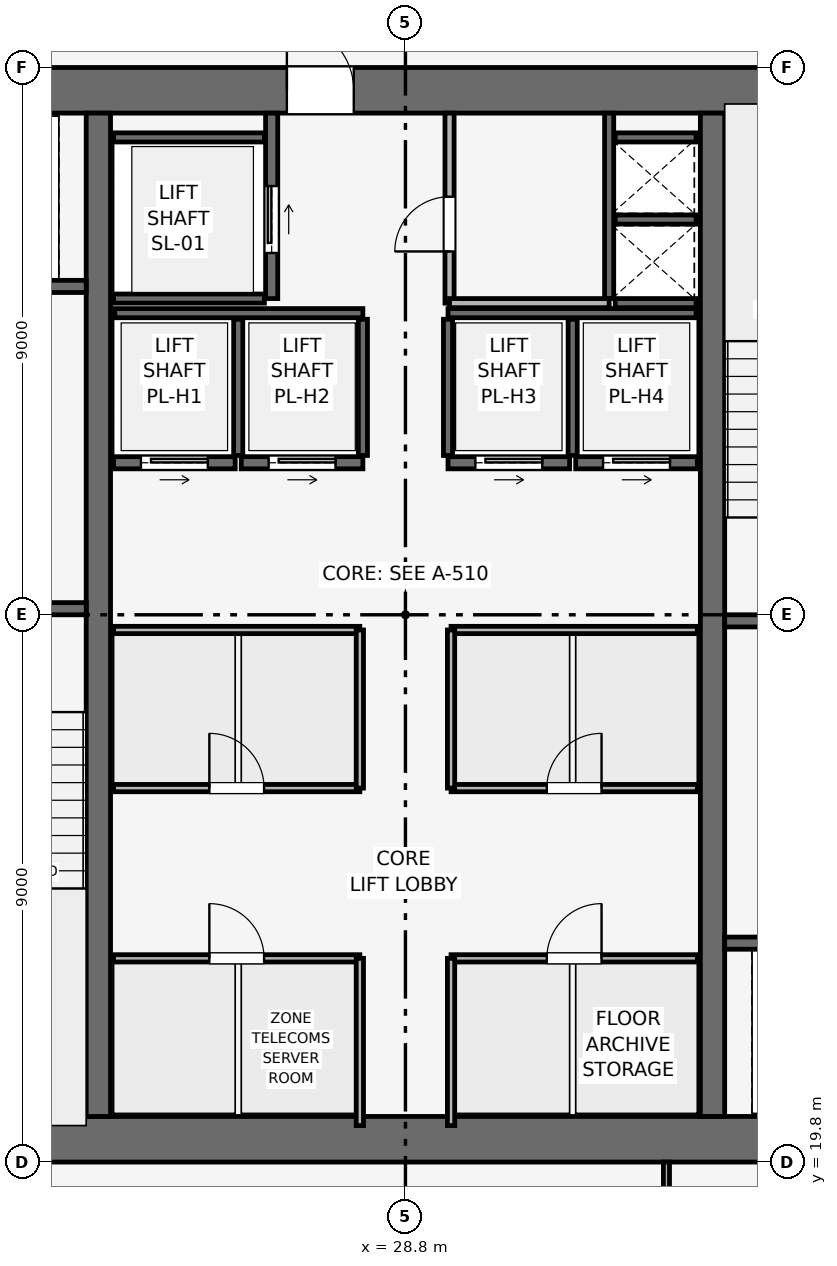
"""IFC4 building model, lengths in metres.
Left out: names, types, materials, properties, quantities, classifications, styles, units other than length and angle.
Written with IfcOpenShell. Run it as: python <this file> out.ifc"""

import sys

from ifc_helpers import new_model, si_unit, direction, frame, frame_2d, origin, place, context, subcontext, project, spatial, rectangle, extrude, element, fill, save


model = new_model("IFC4")
c1 = context("Model", 3, precision=1e-05, world=origin(), true_north=direction((0.0, 1.0)))
c2 = subcontext(c1, "Body", "Model", "MODEL_VIEW")
j1 = project(units=[si_unit("LENGTHUNIT", "METRE"), si_unit("PLANEANGLEUNIT", "RADIAN")], contexts=[c1])
p1 = place(None, origin())
s1 = spatial("IfcSite", under=j1, at=p1, CompositionType="ELEMENT")
p2 = place(p1, origin())
s2 = spatial("IfcBuilding", under=s1, at=p2, CompositionType="ELEMENT")
p3 = place(p2, frame((0.0, 0.0, 250.35)))
s3 = spatial("IfcBuildingStorey", under=s2, at=p3, CompositionType="ELEMENT", Elevation=250.35)
p4 = place(p3, frame((19.8, 20.175, 0.0), z_axis=(0.0, 0.0, 1.0), x_axis=(1.0, 0.0, 0.0)))
e1 = element("IfcWall", 1, at=p4, inside=s3, PredefinedType="SHEAR", context=c2, shape_type="SweptSolid", body=[
    extrude(rectangle(XDim=18.0, YDim=0.75, at=frame_2d((9.0, 0.0))), origin(), (0.0, 0.0, 1.0), 3.75),
])
p5 = place(p3, frame((19.8, 37.425, 0.0), z_axis=(0.0, 0.0, 1.0), x_axis=(1.0, 0.0, 0.0)))
e2 = element("IfcWall", 2, at=p5, inside=s3, PredefinedType="SHEAR", context=c2, shape_type="SweptSolid", body=[
    extrude(rectangle(XDim=18.0, YDim=0.75, at=frame_2d((9.0, 0.0))), origin(), (0.0, 0.0, 1.0), 3.75),
])
p6 = place(p5, frame((7.05, 0.0, 0.0)))
e3 = element("IfcOpeningElement", 3, at=p6, cuts=e2, PredefinedType="OPENING", context=c2, shape_type="SweptSolid", body=[
    extrude(rectangle(XDim=1.1, YDim=2.15, at=frame_2d((0.55, 1.075))), frame((0.0, 0.385, 0.0), z_axis=(0.0, -1.0, 0.0), x_axis=(1.0, 0.0, 0.0)), (0.0, 0.0, 1.0), 0.77),
])
for number, where, z_axis, x_axis in (
    (4, (23.75, 20.55, 0.0), (0.0, 0.0, 1.0), (0.0, 1.0, 0.0)),
    (5, (33.85, 20.55, 0.0), (0.0, 0.0, 1.0), (0.0, 1.0, 0.0)),
):
    element("IfcWall", number, at=place(p3, frame(where, z_axis=z_axis, x_axis=x_axis)), inside=s3, PredefinedType="SHEAR", context=c2, shape_type="SweptSolid", body=[
        extrude(rectangle(XDim=16.5, YDim=0.4, at=frame_2d((8.25, 0.0))), origin(), (0.0, 0.0, 1.0), 3.75),
    ])
p7 = place(p3, frame((20.4, 28.9, 0.0), z_axis=(0.0, 0.0, 1.0), x_axis=(1.0, 0.0, 0.0)))
e6 = element("IfcWall", 6, at=p7, inside=s3, PredefinedType="SHEAR", context=c2, shape_type="SweptSolid", body=[
    extrude(rectangle(XDim=3.15, YDim=0.2, at=frame_2d((1.575, 0.0))), origin(), (0.0, 0.0, 1.0), 3.5),
])
p8 = place(p7, frame((0.8, 0.0, 0.0)))
e7 = element("IfcOpeningElement", 7, at=p8, cuts=e6, PredefinedType="OPENING", context=c2, shape_type="SweptSolid", body=[
    extrude(rectangle(XDim=1.0, YDim=2.1, at=frame_2d((0.5, 1.05))), frame((0.0, 0.11, 0.0), z_axis=(0.0, -1.0, 0.0), x_axis=(1.0, 0.0, 0.0)), (0.0, 0.0, 1.0), 0.22),
])
p9 = place(p3, frame((34.05, 28.7, 0.0), z_axis=(0.0, 0.0, 1.0), x_axis=(1.0, 0.0, 0.0)))
e8 = element("IfcWall", 8, at=p9, inside=s3, PredefinedType="SHEAR", context=c2, shape_type="SweptSolid", body=[
    extrude(rectangle(XDim=3.15, YDim=0.2, at=frame_2d((1.575, 0.0))), origin(), (0.0, 0.0, 1.0), 3.5),
])
p10 = place(p9, frame((0.8, 0.0, 0.0)))
e9 = element("IfcOpeningElement", 9, at=p10, cuts=e8, PredefinedType="OPENING", context=c2, shape_type="SweptSolid", body=[
    extrude(rectangle(XDim=1.0, YDim=2.1, at=frame_2d((0.5, 1.05))), frame((0.0, 0.11, 0.0), z_axis=(0.0, -1.0, 0.0), x_axis=(1.0, 0.0, 0.0)), (0.0, 0.0, 1.0), 0.22),
])
p11 = place(p3, frame((32.15, 34.0, 0.0), z_axis=(0.0, 0.0, 1.0), x_axis=(0.0, 1.0, 0.0)))
e10 = element("IfcWall", 10, at=p11, inside=s3, PredefinedType="SHEAR", context=c2, shape_type="SweptSolid", body=[
    extrude(rectangle(XDim=3.05, YDim=0.15, at=frame_2d((1.525, 0.0))), origin(), (0.0, 0.0, 1.0), 3.5),
])
for number, where, z_axis, x_axis in (
    (11, (32.25, 33.925, 0.0), (0.0, 0.0, 1.0), (1.0, 0.0, 0.0)),
    (12, (32.25, 35.3, 0.0), (0.0, 0.0, 1.0), (1.0, 0.0, 0.0)),
):
    element("IfcWall", number, at=place(p3, frame(where, z_axis=z_axis, x_axis=x_axis)), inside=s3, PredefinedType="SHEAR", context=c2, shape_type="SweptSolid", body=[
        extrude(rectangle(XDim=1.33, YDim=0.15, at=frame_2d((0.665, 0.0))), origin(), (0.0, 0.0, 1.0), 3.5),
    ])
p12 = place(p3, frame((20.5, 34.2, 0.0), z_axis=(0.0, 0.0, 1.0), x_axis=(1.0, 0.0, 0.0)))
e13 = element("IfcWall", 13, at=p12, inside=s3, PredefinedType="SHEAR", context=c2, shape_type="SweptSolid", body=[
    extrude(rectangle(XDim=3.05, YDim=0.2, at=frame_2d((1.525, 0.0))), origin(), (0.0, 0.0, 1.0), 3.5),
])
p13 = place(p12, frame((0.75, 0.0, 0.0)))
e14 = element("IfcOpeningElement", 14, at=p13, cuts=e13, PredefinedType="OPENING", context=c2, shape_type="SweptSolid", body=[
    extrude(rectangle(XDim=1.1, YDim=2.15, at=frame_2d((0.55, 1.075))), frame((0.0, 0.11, 0.0), z_axis=(0.0, -1.0, 0.0), x_axis=(1.0, 0.0, 0.0)), (0.0, 0.0, 1.0), 0.22),
])
p14 = place(p3, frame((34.05, 23.4, 0.0), z_axis=(0.0, 0.0, 1.0), x_axis=(1.0, 0.0, 0.0)))
e15 = element("IfcWall", 15, at=p14, inside=s3, PredefinedType="SHEAR", context=c2, shape_type="SweptSolid", body=[
    extrude(rectangle(XDim=3.05, YDim=0.2, at=frame_2d((1.525, 0.0))), origin(), (0.0, 0.0, 1.0), 3.5),
])
p15 = place(p14, frame((1.2, 0.0, 0.0)))
e16 = element("IfcOpeningElement", 16, at=p15, cuts=e15, PredefinedType="OPENING", context=c2, shape_type="SweptSolid", body=[
    extrude(rectangle(XDim=1.1, YDim=2.15, at=frame_2d((0.55, 1.075))), frame((0.0, 0.11, 0.0), z_axis=(0.0, -1.0, 0.0), x_axis=(1.0, 0.0, 0.0)), (0.0, 0.0, 1.0), 0.22),
])
p16 = place(p3, frame((26.6, 34.0, 0.0), z_axis=(0.0, 0.0, 1.0), x_axis=(0.0, 1.0, 0.0)))
e17 = element("IfcWall", 17, at=p16, inside=s3, PredefinedType="SHEAR", context=c2, shape_type="SweptSolid", body=[
    extrude(rectangle(XDim=3.05, YDim=0.2, at=frame_2d((1.525, 0.0))), origin(), (0.0, 0.0, 1.0), 3.5),
])
p17 = place(p16, frame((0.75, 0.0, 0.0)))
e18 = element("IfcOpeningElement", 18, at=p17, cuts=e17, PredefinedType="OPENING", context=c2, shape_type="SweptSolid", body=[
    extrude(rectangle(XDim=1.1, YDim=2.15, at=frame_2d((0.55, 1.075))), frame((0.0, 0.11, 0.0), z_axis=(0.0, -1.0, 0.0), x_axis=(1.0, 0.0, 0.0)), (0.0, 0.0, 1.0), 0.22),
])
for number, where, z_axis, x_axis in (
    (19, (24.0, 34.0, 0.0), (0.0, 0.0, 1.0), (1.0, 0.0, 0.0)),
    (20, (24.0, 36.65, 0.0), (0.0, 0.0, 1.0), (1.0, 0.0, 0.0)),
):
    element("IfcWall", number, at=place(p3, frame(where, z_axis=z_axis, x_axis=x_axis)), inside=s3, PredefinedType="SHEAR", context=c2, shape_type="SweptSolid", body=[
        extrude(rectangle(XDim=2.48, YDim=0.15, at=frame_2d((1.24, 0.0))), origin(), (0.0, 0.0, 1.0), 3.5),
    ])
p18 = place(p3, frame((24.0, 31.3, 0.0), z_axis=(0.0, 0.0, 1.0), x_axis=(1.0, 0.0, 0.0)))
e21 = element("IfcWall", 21, at=p18, inside=s3, PredefinedType="SHEAR", context=c2, shape_type="SweptSolid", body=[
    extrude(rectangle(XDim=2.0, YDim=0.2, at=frame_2d((1.0, 0.0))), origin(), (0.0, 0.0, 1.0), 3.5),
])
p19 = place(p18, frame((0.45, 0.0, 0.0)))
e22 = element("IfcOpeningElement", 22, at=p19, cuts=e21, PredefinedType="OPENING", context=c2, shape_type="SweptSolid", body=[
    extrude(rectangle(XDim=1.1, YDim=2.15, at=frame_2d((0.55, 1.075))), frame((0.0, 0.11, 0.0), z_axis=(0.0, -1.0, 0.0), x_axis=(1.0, 0.0, 0.0)), (0.0, 0.0, 1.0), 0.22),
])
p20 = place(p3, frame((26.1, 31.3, 0.0), z_axis=(0.0, 0.0, 1.0), x_axis=(1.0, 0.0, 0.0)))
e23 = element("IfcWall", 23, at=p20, inside=s3, PredefinedType="SHEAR", context=c2, shape_type="SweptSolid", body=[
    extrude(rectangle(XDim=2.0, YDim=0.2, at=frame_2d((1.0, 0.0))), origin(), (0.0, 0.0, 1.0), 3.5),
])
p21 = place(p20, frame((0.45, 0.0, 0.0)))
e24 = element("IfcOpeningElement", 24, at=p21, cuts=e23, PredefinedType="OPENING", context=c2, shape_type="SweptSolid", body=[
    extrude(rectangle(XDim=1.1, YDim=2.15, at=frame_2d((0.55, 1.075))), frame((0.0, 0.11, 0.0), z_axis=(0.0, -1.0, 0.0), x_axis=(1.0, 0.0, 0.0)), (0.0, 0.0, 1.0), 0.22),
])
p22 = place(p3, frame((29.5, 31.3, 0.0), z_axis=(0.0, 0.0, 1.0), x_axis=(1.0, 0.0, 0.0)))
e25 = element("IfcWall", 25, at=p22, inside=s3, PredefinedType="SHEAR", context=c2, shape_type="SweptSolid", body=[
    extrude(rectangle(XDim=2.0, YDim=0.2, at=frame_2d((1.0, 0.0))), origin(), (0.0, 0.0, 1.0), 3.5),
])
p23 = place(p22, frame((0.45, 0.0, 0.0)))
e26 = element("IfcOpeningElement", 26, at=p23, cuts=e25, PredefinedType="OPENING", context=c2, shape_type="SweptSolid", body=[
    extrude(rectangle(XDim=1.1, YDim=2.15, at=frame_2d((0.55, 1.075))), frame((0.0, 0.11, 0.0), z_axis=(0.0, -1.0, 0.0), x_axis=(1.0, 0.0, 0.0)), (0.0, 0.0, 1.0), 0.22),
])
p24 = place(p3, frame((31.6, 31.3, 0.0), z_axis=(0.0, 0.0, 1.0), x_axis=(1.0, 0.0, 0.0)))
e27 = element("IfcWall", 27, at=p24, inside=s3, PredefinedType="SHEAR", context=c2, shape_type="SweptSolid", body=[
    extrude(rectangle(XDim=2.0, YDim=0.2, at=frame_2d((1.0, 0.0))), origin(), (0.0, 0.0, 1.0), 3.5),
])
p25 = place(p24, frame((0.45, 0.0, 0.0)))
e28 = element("IfcOpeningElement", 28, at=p25, cuts=e27, PredefinedType="OPENING", context=c2, shape_type="SweptSolid", body=[
    extrude(rectangle(XDim=1.1, YDim=2.15, at=frame_2d((0.55, 1.075))), frame((0.0, 0.11, 0.0), z_axis=(0.0, -1.0, 0.0), x_axis=(1.0, 0.0, 0.0)), (0.0, 0.0, 1.0), 0.22),
])
p26 = place(p3, frame((32.25, 36.65, 0.0), z_axis=(0.0, 0.0, 1.0), x_axis=(1.0, 0.0, 0.0)))
e29 = element("IfcWall", 29, at=p26, inside=s3, PredefinedType="SHEAR", context=c2, shape_type="SweptSolid", body=[
    extrude(rectangle(XDim=1.33, YDim=0.15, at=frame_2d((0.665, 0.0))), origin(), (0.0, 0.0, 1.0), 3.5),
])
for number, where, z_axis, x_axis in (
    (30, (24.02, 33.76, 0.0), (0.0, 0.0, 1.0), (1.0, 0.0, 0.0)),
    (31, (29.5, 33.76, 0.0), (0.0, 0.0, 1.0), (1.0, 0.0, 0.0)),
):
    element("IfcWall", number, at=place(p3, frame(where, z_axis=z_axis, x_axis=x_axis)), inside=s3, PredefinedType="SHEAR", context=c2, shape_type="SweptSolid", body=[
        extrude(rectangle(XDim=4.08, YDim=0.15, at=frame_2d((2.04, 0.0))), origin(), (0.0, 0.0, 1.0), 3.5),
    ])
for number, where, z_axis, x_axis in (
    (32, (26.05, 31.42, 0.0), (0.0, 0.0, 1.0), (0.0, 1.0, 0.0)),
    (33, (28.1, 31.42, 0.0), (0.0, 0.0, 1.0), (0.0, 1.0, 0.0)),
    (34, (29.5, 31.42, 0.0), (0.0, 0.0, 1.0), (0.0, 1.0, 0.0)),
    (35, (31.55, 31.42, 0.0), (0.0, 0.0, 1.0), (0.0, 1.0, 0.0)),
):
    element("IfcWall", number, at=place(p3, frame(where, z_axis=z_axis, x_axis=x_axis)), inside=s3, PredefinedType="SHEAR", context=c2, shape_type="SweptSolid", body=[
        extrude(rectangle(XDim=2.24, YDim=0.15, at=frame_2d((1.12, 0.0))), origin(), (0.0, 0.0, 1.0), 3.5),
    ])
p27 = place(p3, frame((29.525, 33.925, 0.0), z_axis=(0.0, 0.0, 1.0), x_axis=(0.0, 1.0, 0.0)))
e36 = element("IfcWall", 36, at=p27, inside=s3, PredefinedType="PARTITIONING", context=c2, shape_type="SweptSolid", body=[
    extrude(rectangle(XDim=3.125, YDim=0.15, at=frame_2d((1.562, 0.0))), origin(), (0.0, 0.0, 1.0), 3.5),
])
p28 = place(p27, frame((0.85, 0.0, 0.0)))
e37 = element("IfcOpeningElement", 37, at=p28, cuts=e36, PredefinedType="OPENING", context=c2, shape_type="SweptSolid", body=[
    extrude(rectangle(XDim=0.9, YDim=2.1, at=frame_2d((0.45, 1.05))), frame((0.0, 0.085, 0.0), z_axis=(0.0, -1.0, 0.0), x_axis=(1.0, 0.0, 0.0)), (0.0, 0.0, 1.0), 0.17),
])
p29 = place(p3, frame((29.525, 33.925, 0.0), z_axis=(0.0, 0.0, 1.0), x_axis=(1.0, 0.0, 0.0)))
e38 = element("IfcWall", 38, at=p29, inside=s3, PredefinedType="PARTITIONING", context=c2, shape_type="SweptSolid", body=[
    extrude(rectangle(XDim=2.625, YDim=0.15, at=frame_2d((1.312, 0.0))), origin(), (0.0, 0.0, 1.0), 3.5),
])
p30 = place(p3, frame((24.0, 23.15, 0.0), z_axis=(0.0, 0.0, 1.0), x_axis=(1.0, 0.0, 0.0)))
e39 = element("IfcWall", 39, at=p30, inside=s3, PredefinedType="PARTITIONING", context=c2, shape_type="SweptSolid", body=[
    extrude(rectangle(XDim=4.05, YDim=0.12, at=frame_2d((2.025, 0.0))), origin(), (0.0, 0.0, 1.0), 3.5),
])
p31 = place(p30, frame((1.575, 0.0, 0.0)))
e40 = element("IfcOpeningElement", 40, at=p31, cuts=e39, PredefinedType="OPENING", context=c2, shape_type="SweptSolid", body=[
    extrude(rectangle(XDim=0.9, YDim=2.1, at=frame_2d((0.45, 1.05))), frame((0.0, 0.07, 0.0), z_axis=(0.0, -1.0, 0.0), x_axis=(1.0, 0.0, 0.0)), (0.0, 0.0, 1.0), 0.14),
])
p32 = place(p3, frame((28.05, 20.4, 0.0), z_axis=(0.0, 0.0, 1.0), x_axis=(0.0, 1.0, 0.0)))
e41 = element("IfcWall", 41, at=p32, inside=s3, PredefinedType="PARTITIONING", context=c2, shape_type="SweptSolid", body=[
    extrude(rectangle(XDim=2.75, YDim=0.12, at=frame_2d((1.375, 0.0))), origin(), (0.0, 0.0, 1.0), 3.5),
])
p33 = place(p3, frame((29.55, 23.15, 0.0), z_axis=(0.0, 0.0, 1.0), x_axis=(1.0, 0.0, 0.0)))
e42 = element("IfcWall", 42, at=p33, inside=s3, PredefinedType="PARTITIONING", context=c2, shape_type="SweptSolid", body=[
    extrude(rectangle(XDim=4.05, YDim=0.12, at=frame_2d((2.025, 0.0))), origin(), (0.0, 0.0, 1.0), 3.5),
])
p34 = place(p33, frame((1.575, 0.0, 0.0)))
e43 = element("IfcOpeningElement", 43, at=p34, cuts=e42, PredefinedType="OPENING", context=c2, shape_type="SweptSolid", body=[
    extrude(rectangle(XDim=0.9, YDim=2.1, at=frame_2d((0.45, 1.05))), frame((0.0, 0.07, 0.0), z_axis=(0.0, -1.0, 0.0), x_axis=(1.0, 0.0, 0.0)), (0.0, 0.0, 1.0), 0.14),
])
p35 = place(p3, frame((29.55, 20.4, 0.0), z_axis=(0.0, 0.0, 1.0), x_axis=(0.0, 1.0, 0.0)))
e44 = element("IfcWall", 44, at=p35, inside=s3, PredefinedType="PARTITIONING", context=c2, shape_type="SweptSolid", body=[
    extrude(rectangle(XDim=2.75, YDim=0.12, at=frame_2d((1.375, 0.0))), origin(), (0.0, 0.0, 1.0), 3.5),
])
p36 = place(p3, frame((24.0, 25.95, 0.0), z_axis=(0.0, 0.0, 1.0), x_axis=(1.0, 0.0, 0.0)))
e45 = element("IfcWall", 45, at=p36, inside=s3, PredefinedType="PARTITIONING", context=c2, shape_type="SweptSolid", body=[
    extrude(rectangle(XDim=4.05, YDim=0.12, at=frame_2d((2.025, 0.0))), origin(), (0.0, 0.0, 1.0), 3.5),
])
p37 = place(p36, frame((1.575, 0.0, 0.0)))
e46 = element("IfcOpeningElement", 46, at=p37, cuts=e45, PredefinedType="OPENING", context=c2, shape_type="SweptSolid", body=[
    extrude(rectangle(XDim=0.9, YDim=2.1, at=frame_2d((0.45, 1.05))), frame((0.0, 0.07, 0.0), z_axis=(0.0, -1.0, 0.0), x_axis=(1.0, 0.0, 0.0)), (0.0, 0.0, 1.0), 0.14),
])
p38 = place(p3, frame((24.0, 28.55, 0.0), z_axis=(0.0, 0.0, 1.0), x_axis=(1.0, 0.0, 0.0)))
e47 = element("IfcWall", 47, at=p38, inside=s3, PredefinedType="PARTITIONING", context=c2, shape_type="SweptSolid", body=[
    extrude(rectangle(XDim=4.05, YDim=0.12, at=frame_2d((2.025, 0.0))), origin(), (0.0, 0.0, 1.0), 3.5),
])
p39 = place(p3, frame((28.05, 25.95, 0.0), z_axis=(0.0, 0.0, 1.0), x_axis=(0.0, 1.0, 0.0)))
e48 = element("IfcWall", 48, at=p39, inside=s3, PredefinedType="PARTITIONING", context=c2, shape_type="SweptSolid", body=[
    extrude(rectangle(XDim=2.6, YDim=0.12, at=frame_2d((1.3, 0.0))), origin(), (0.0, 0.0, 1.0), 3.5),
])
p40 = place(p3, frame((29.55, 25.95, 0.0), z_axis=(0.0, 0.0, 1.0), x_axis=(1.0, 0.0, 0.0)))
e49 = element("IfcWall", 49, at=p40, inside=s3, PredefinedType="PARTITIONING", context=c2, shape_type="SweptSolid", body=[
    extrude(rectangle(XDim=4.05, YDim=0.12, at=frame_2d((2.025, 0.0))), origin(), (0.0, 0.0, 1.0), 3.5),
])
p41 = place(p40, frame((1.575, 0.0, 0.0)))
e50 = element("IfcOpeningElement", 50, at=p41, cuts=e49, PredefinedType="OPENING", context=c2, shape_type="SweptSolid", body=[
    extrude(rectangle(XDim=0.9, YDim=2.1, at=frame_2d((0.45, 1.05))), frame((0.0, 0.07, 0.0), z_axis=(0.0, -1.0, 0.0), x_axis=(1.0, 0.0, 0.0)), (0.0, 0.0, 1.0), 0.14),
])
p42 = place(p3, frame((29.55, 28.55, 0.0), z_axis=(0.0, 0.0, 1.0), x_axis=(1.0, 0.0, 0.0)))
e51 = element("IfcWall", 51, at=p42, inside=s3, PredefinedType="PARTITIONING", context=c2, shape_type="SweptSolid", body=[
    extrude(rectangle(XDim=4.05, YDim=0.12, at=frame_2d((2.025, 0.0))), origin(), (0.0, 0.0, 1.0), 3.5),
])
p43 = place(p3, frame((29.55, 25.95, 0.0), z_axis=(0.0, 0.0, 1.0), x_axis=(0.0, 1.0, 0.0)))
e52 = element("IfcWall", 52, at=p43, inside=s3, PredefinedType="PARTITIONING", context=c2, shape_type="SweptSolid", body=[
    extrude(rectangle(XDim=2.6, YDim=0.12, at=frame_2d((1.3, 0.0))), origin(), (0.0, 0.0, 1.0), 3.5),
])
p44 = place(p3, frame((33.092, 4.03, 0.0), z_axis=(0.0, 0.0, 1.0), x_axis=(0.0, 1.0, 0.0)))
e53 = element("IfcWall", 53, at=p44, inside=s3, PredefinedType="MOVABLE", context=c2, shape_type="SweptSolid", body=[
    extrude(rectangle(XDim=15.77, YDim=0.1, at=frame_2d((7.885, 0.0))), origin(), (0.0, 0.0, 1.0), 3.085),
])
p45 = place(p44, frame((13.37, 0.0, 0.0)))
e54 = element("IfcOpeningElement", 54, at=p45, cuts=e53, PredefinedType="OPENING", context=c2, shape_type="SweptSolid", body=[
    extrude(rectangle(XDim=0.9, YDim=2.1, at=frame_2d((0.45, 1.05))), frame((0.0, 0.06, 0.0), z_axis=(0.0, -1.0, 0.0), x_axis=(1.0, 0.0, 0.0)), (0.0, 0.0, 1.0), 0.12),
])
p46 = place(p17, origin())
e55 = element("IfcDoor", 55, at=p46, inside=s3, OperationType="SLIDING_TO_RIGHT", PredefinedType="DOOR", context=c2, shape_type="SweptSolid", body=[
    extrude(rectangle(XDim=1.1, YDim=2.15, at=frame_2d((0.55, 1.075))), frame((0.0, 0.025, 0.0), z_axis=(0.0, -1.0, 0.0), x_axis=(1.0, 0.0, 0.0)), (0.0, 0.0, 1.0), 0.05),
])
fill(e18, e55)
p47 = place(p19, origin())
e56 = element("IfcDoor", 56, at=p47, inside=s3, OperationType="SLIDING_TO_RIGHT", PredefinedType="DOOR", context=c2, shape_type="SweptSolid", body=[
    extrude(rectangle(XDim=1.1, YDim=2.15, at=frame_2d((0.55, 1.075))), frame((0.0, 0.025, 0.0), z_axis=(0.0, -1.0, 0.0), x_axis=(1.0, 0.0, 0.0)), (0.0, 0.0, 1.0), 0.05),
])
fill(e22, e56)
p48 = place(p21, origin())
e57 = element("IfcDoor", 57, at=p48, inside=s3, OperationType="SLIDING_TO_RIGHT", PredefinedType="DOOR", context=c2, shape_type="SweptSolid", body=[
    extrude(rectangle(XDim=1.1, YDim=2.15, at=frame_2d((0.55, 1.075))), frame((0.0, 0.025, 0.0), z_axis=(0.0, -1.0, 0.0), x_axis=(1.0, 0.0, 0.0)), (0.0, 0.0, 1.0), 0.05),
])
fill(e24, e57)
p49 = place(p23, origin())
e58 = element("IfcDoor", 58, at=p49, inside=s3, OperationType="SLIDING_TO_RIGHT", PredefinedType="DOOR", context=c2, shape_type="SweptSolid", body=[
    extrude(rectangle(XDim=1.1, YDim=2.15, at=frame_2d((0.55, 1.075))), frame((0.0, 0.025, 0.0), z_axis=(0.0, -1.0, 0.0), x_axis=(1.0, 0.0, 0.0)), (0.0, 0.0, 1.0), 0.05),
])
fill(e26, e58)
p50 = place(p25, origin())
e59 = element("IfcDoor", 59, at=p50, inside=s3, OperationType="SLIDING_TO_RIGHT", PredefinedType="DOOR", context=c2, shape_type="SweptSolid", body=[
    extrude(rectangle(XDim=1.1, YDim=2.15, at=frame_2d((0.55, 1.075))), frame((0.0, 0.025, 0.0), z_axis=(0.0, -1.0, 0.0), x_axis=(1.0, 0.0, 0.0)), (0.0, 0.0, 1.0), 0.05),
])
fill(e28, e59)
p51 = place(p28, origin())
e60 = element("IfcDoor", 60, at=p51, inside=s3, OperationType="SINGLE_SWING_LEFT", PredefinedType="DOOR", context=c2, shape_type="SweptSolid", body=[
    extrude(rectangle(XDim=0.9, YDim=2.1, at=frame_2d((0.45, 1.05))), frame((0.0, 0.025, 0.0), z_axis=(0.0, -1.0, 0.0), x_axis=(1.0, 0.0, 0.0)), (0.0, 0.0, 1.0), 0.05),
])
fill(e37, e60)
p52 = place(p31, origin())
e61 = element("IfcDoor", 61, at=p52, inside=s3, OperationType="SINGLE_SWING_LEFT", PredefinedType="DOOR", context=c2, shape_type="SweptSolid", body=[
    extrude(rectangle(XDim=0.9, YDim=2.1, at=frame_2d((0.45, 1.05))), frame((0.0, 0.025, 0.0), z_axis=(0.0, -1.0, 0.0), x_axis=(1.0, 0.0, 0.0)), (0.0, 0.0, 1.0), 0.05),
])
fill(e40, e61)
p53 = place(p34, origin())
e62 = element("IfcDoor", 62, at=p53, inside=s3, OperationType="SINGLE_SWING_RIGHT", PredefinedType="DOOR", context=c2, shape_type="SweptSolid", body=[
    extrude(rectangle(XDim=0.9, YDim=2.1, at=frame_2d((0.45, 1.05))), frame((0.0, 0.025, 0.0), z_axis=(0.0, -1.0, 0.0), x_axis=(1.0, 0.0, 0.0)), (0.0, 0.0, 1.0), 0.05),
])
fill(e43, e62)
p54 = place(p37, origin())
e63 = element("IfcDoor", 63, at=p54, inside=s3, OperationType="SINGLE_SWING_LEFT", PredefinedType="DOOR", context=c2, shape_type="SweptSolid", body=[
    extrude(rectangle(XDim=0.9, YDim=2.1, at=frame_2d((0.45, 1.05))), frame((0.0, 0.025, 0.0), z_axis=(0.0, -1.0, 0.0), x_axis=(1.0, 0.0, 0.0)), (0.0, 0.0, 1.0), 0.05),
])
fill(e46, e63)
p55 = place(p41, origin())
e64 = element("IfcDoor", 64, at=p55, inside=s3, OperationType="SINGLE_SWING_RIGHT", PredefinedType="DOOR", context=c2, shape_type="SweptSolid", body=[
    extrude(rectangle(XDim=0.9, YDim=2.1, at=frame_2d((0.45, 1.05))), frame((0.0, 0.025, 0.0), z_axis=(0.0, -1.0, 0.0), x_axis=(1.0, 0.0, 0.0)), (0.0, 0.0, 1.0), 0.05),
])
fill(e50, e64)
p56 = place(p6, origin())
e65 = element("IfcDoor", 65, at=p56, inside=s3, OperationType="SINGLE_SWING_LEFT", PredefinedType="DOOR", context=c2, shape_type="SweptSolid", body=[
    extrude(rectangle(XDim=1.1, YDim=2.15, at=frame_2d((0.55, 1.075))), frame((0.0, 0.025, 0.0), z_axis=(0.0, -1.0, 0.0), x_axis=(1.0, 0.0, 0.0)), (0.0, 0.0, 1.0), 0.05),
])
fill(e3, e65)
save(model, sys.argv[1])
